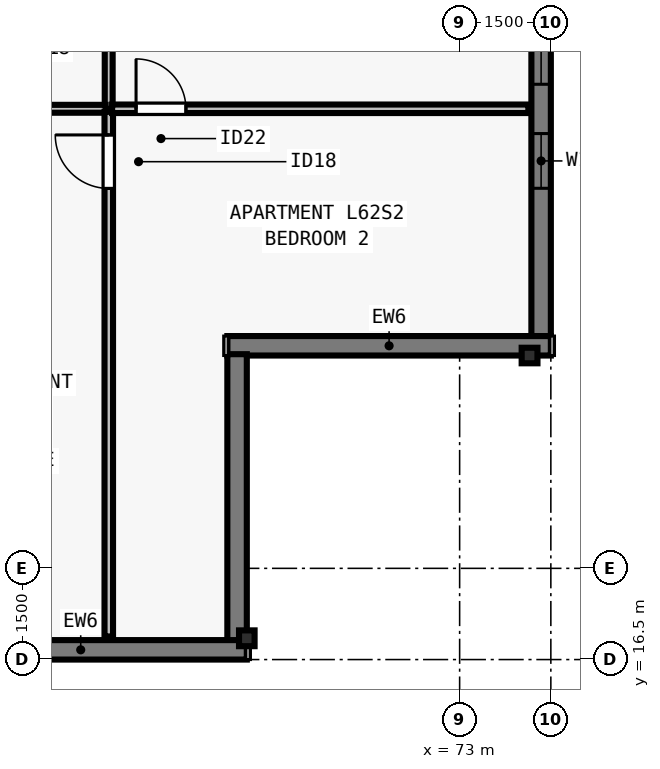
"""IFC4 building model, lengths in metres.
Left out: names, types, materials, properties, quantities, classifications, styles, units other than length and angle.
Written with IfcOpenShell. Run it as: python <this file> out.ifc"""

import sys

from ifc_helpers import new_model, si_unit, direction, frame, frame_2d, origin, origin_2d, place, context, subcontext, project, spatial, rectangle, i_section, extrude, element, fill, save


model = new_model("IFC4")
c1 = context("Model", 3, precision=1e-05, world=origin(), true_north=direction((0.0, 1.0)))
c2 = subcontext(c1, "Body", "Model", "MODEL_VIEW")
j1 = project(units=[si_unit("LENGTHUNIT", "METRE"), si_unit("PLANEANGLEUNIT", "RADIAN")], contexts=[c1])
p1 = place(None, origin())
s1 = spatial("IfcSite", under=j1, at=p1, CompositionType="ELEMENT")
p2 = place(p1, origin())
s2 = spatial("IfcBuilding", under=s1, at=p2, CompositionType="ELEMENT")
p3 = place(p2, frame((0.0, 0.0, 227.0)))
s3 = spatial("IfcBuildingStorey", under=s2, at=p3, CompositionType="ELEMENT", Elevation=227.0)
for number, where, z_axis, x_axis in (
    (1, (69.5, 16.85, 0.0), (0.0, 0.0, 1.0), (1.0, 0.0, 0.0)),
    (2, (74.15, 21.5, 0.0), (0.0, 0.0, 1.0), (0.0, 1.0, 0.0)),
):
    element("IfcColumn", number, at=place(p3, frame(where, z_axis=z_axis, x_axis=x_axis)), inside=s3, PredefinedType="COLUMN", context=c2, shape_type="SweptSolid", body=[
        extrude(i_section(OverallWidth=0.256, OverallDepth=0.26, WebThickness=0.01, FlangeThickness=0.017, FilletRadius=0.013, at=origin_2d()), origin(), (0.0, 0.0, 1.0), 3.5),
    ])
p4 = place(p3, frame((74.34, 56.5, 0.0), z_axis=(0.0, 0.0, 1.0), x_axis=(0.0, -1.0, 0.0)))
e3 = element("IfcWall", 3, at=p4, inside=s3, PredefinedType="SOLIDWALL", context=c2, shape_type="SweptSolid", body=[
    extrude(rectangle(XDim=34.702, YDim=0.32, at=frame_2d((17.351, 0.0))), origin(), (0.0, 0.0, 1.0), 3.29),
])
p5 = place(p4, frame((4.763, 0.0, 0.8)))
e4 = element("IfcOpeningElement", 4, at=p5, cuts=e3, PredefinedType="OPENING", context=c2, shape_type="SweptSolid", body=[
    extrude(rectangle(XDim=1.55, YDim=1.678, at=frame_2d((0.775, 0.839))), frame((0.0, 0.17, 0.0), z_axis=(0.0, -1.0, 0.0), x_axis=(1.0, 0.0, 0.0)), (0.0, 0.0, 1.0), 0.34),
])
p6 = place(p4, frame((9.238, 0.0, 0.8)))
e5 = element("IfcOpeningElement", 5, at=p6, cuts=e3, PredefinedType="OPENING", context=c2, shape_type="SweptSolid", body=[
    extrude(rectangle(XDim=1.85, YDim=1.678, at=frame_2d((0.925, 0.839))), frame((0.0, 0.17, 0.0), z_axis=(0.0, -1.0, 0.0), x_axis=(1.0, 0.0, 0.0)), (0.0, 0.0, 1.0), 0.34),
])
p7 = place(p4, frame((14.738, 0.0, 0.8)))
e6 = element("IfcOpeningElement", 6, at=p7, cuts=e3, PredefinedType="OPENING", context=c2, shape_type="SweptSolid", body=[
    extrude(rectangle(XDim=1.85, YDim=1.678, at=frame_2d((0.925, 0.839))), frame((0.0, 0.17, 0.0), z_axis=(0.0, -1.0, 0.0), x_axis=(1.0, 0.0, 0.0)), (0.0, 0.0, 1.0), 0.34),
])
p8 = place(p4, frame((18.264, 0.0, 0.8)))
e7 = element("IfcOpeningElement", 7, at=p8, cuts=e3, PredefinedType="OPENING", context=c2, shape_type="SweptSolid", body=[
    extrude(rectangle(XDim=1.55, YDim=1.678, at=frame_2d((0.775, 0.839))), frame((0.0, 0.17, 0.0), z_axis=(0.0, -1.0, 0.0), x_axis=(1.0, 0.0, 0.0)), (0.0, 0.0, 1.0), 0.34),
])
p9 = place(p4, frame((24.164, 0.0, 0.8)))
e8 = element("IfcOpeningElement", 8, at=p9, cuts=e3, PredefinedType="OPENING", context=c2, shape_type="SweptSolid", body=[
    extrude(rectangle(XDim=1.55, YDim=1.678, at=frame_2d((0.775, 0.839))), frame((0.0, 0.17, 0.0), z_axis=(0.0, -1.0, 0.0), x_axis=(1.0, 0.0, 0.0)), (0.0, 0.0, 1.0), 0.34),
])
p10 = place(p4, frame((28.689, 0.0, 0.8)))
e9 = element("IfcOpeningElement", 9, at=p10, cuts=e3, PredefinedType="OPENING", context=c2, shape_type="SweptSolid", body=[
    extrude(rectangle(XDim=1.85, YDim=1.678, at=frame_2d((0.925, 0.839))), frame((0.0, 0.17, 0.0), z_axis=(0.0, -1.0, 0.0), x_axis=(1.0, 0.0, 0.0)), (0.0, 0.0, 1.0), 0.34),
])
p11 = place(p4, frame((31.35, 0.0, 0.8)))
e10 = element("IfcOpeningElement", 10, at=p11, cuts=e3, PredefinedType="OPENING", context=c2, shape_type="SweptSolid", body=[
    extrude(rectangle(XDim=0.9, YDim=1.678, at=frame_2d((0.45, 0.839))), frame((0.0, 0.17, 0.0), z_axis=(0.0, -1.0, 0.0), x_axis=(1.0, 0.0, 0.0)), (0.0, 0.0, 1.0), 0.34),
])
p12 = place(p3, frame((74.5, 21.66, 0.0), z_axis=(0.0, 0.0, 1.0), x_axis=(-1.0, 0.0, 0.0)))
e11 = element("IfcWall", 11, at=p12, inside=s3, PredefinedType="SOLIDWALL", context=c2, shape_type="SweptSolid", body=[
    extrude(rectangle(XDim=5.32, YDim=0.32, at=frame_2d((2.66, 0.0))), origin(), (0.0, 0.0, 1.0), 3.29),
])
p13 = place(p3, frame((69.34, 21.522, 0.0), z_axis=(0.0, 0.0, 1.0), x_axis=(0.0, -1.0, 0.0)))
e12 = element("IfcWall", 12, at=p13, inside=s3, PredefinedType="SOLIDWALL", context=c2, shape_type="SweptSolid", body=[
    extrude(rectangle(XDim=4.724, YDim=0.32, at=frame_2d((2.362, 0.0))), origin(), (0.0, 0.0, 1.0), 3.29),
])
p14 = place(p3, frame((69.5, 16.66, 0.0), z_axis=(0.0, 0.0, 1.0), x_axis=(-1.0, 0.0, 0.0)))
e13 = element("IfcWall", 13, at=p14, inside=s3, PredefinedType="SOLIDWALL", context=c2, shape_type="SweptSolid", body=[
    extrude(rectangle(XDim=34.702, YDim=0.32, at=frame_2d((17.351, 0.0))), origin(), (0.0, 0.0, 1.0), 3.29),
])
p15 = place(p14, frame((5.613, 0.0, 0.8)))
e14 = element("IfcOpeningElement", 14, at=p15, cuts=e13, PredefinedType="OPENING", context=c2, shape_type="SweptSolid", body=[
    extrude(rectangle(XDim=1.55, YDim=1.678, at=frame_2d((0.775, 0.839))), frame((0.0, 0.17, 0.0), z_axis=(0.0, -1.0, 0.0), x_axis=(1.0, 0.0, 0.0)), (0.0, 0.0, 1.0), 0.34),
])
p16 = place(p14, frame((7.988, 0.0, 0.8)))
e15 = element("IfcOpeningElement", 15, at=p16, cuts=e13, PredefinedType="OPENING", context=c2, shape_type="SweptSolid", body=[
    extrude(rectangle(XDim=1.85, YDim=1.678, at=frame_2d((0.925, 0.839))), frame((0.0, 0.17, 0.0), z_axis=(0.0, -1.0, 0.0), x_axis=(1.0, 0.0, 0.0)), (0.0, 0.0, 1.0), 0.34),
])
p17 = place(p14, frame((10.263, 0.0, 0.8)))
e16 = element("IfcOpeningElement", 16, at=p17, cuts=e13, PredefinedType="OPENING", context=c2, shape_type="SweptSolid", body=[
    extrude(rectangle(XDim=1.55, YDim=1.678, at=frame_2d((0.775, 0.839))), frame((0.0, 0.17, 0.0), z_axis=(0.0, -1.0, 0.0), x_axis=(1.0, 0.0, 0.0)), (0.0, 0.0, 1.0), 0.34),
])
p18 = place(p14, frame((14.738, 0.0, 0.8)))
e17 = element("IfcOpeningElement", 17, at=p18, cuts=e13, PredefinedType="OPENING", context=c2, shape_type="SweptSolid", body=[
    extrude(rectangle(XDim=1.85, YDim=1.678, at=frame_2d((0.925, 0.839))), frame((0.0, 0.17, 0.0), z_axis=(0.0, -1.0, 0.0), x_axis=(1.0, 0.0, 0.0)), (0.0, 0.0, 1.0), 0.34),
])
p19 = place(p14, frame((18.264, 0.0, 0.8)))
e18 = element("IfcOpeningElement", 18, at=p19, cuts=e13, PredefinedType="OPENING", context=c2, shape_type="SweptSolid", body=[
    extrude(rectangle(XDim=1.55, YDim=1.678, at=frame_2d((0.775, 0.839))), frame((0.0, 0.17, 0.0), z_axis=(0.0, -1.0, 0.0), x_axis=(1.0, 0.0, 0.0)), (0.0, 0.0, 1.0), 0.34),
])
p20 = place(p14, frame((24.564, 0.0, 0.8)))
e19 = element("IfcOpeningElement", 19, at=p20, cuts=e13, PredefinedType="OPENING", context=c2, shape_type="SweptSolid", body=[
    extrude(rectangle(XDim=1.55, YDim=1.678, at=frame_2d((0.775, 0.839))), frame((0.0, 0.17, 0.0), z_axis=(0.0, -1.0, 0.0), x_axis=(1.0, 0.0, 0.0)), (0.0, 0.0, 1.0), 0.34),
])
p21 = place(p14, frame((28.24, 0.0, 0.8)))
e20 = element("IfcOpeningElement", 20, at=p21, cuts=e13, PredefinedType="OPENING", context=c2, shape_type="SweptSolid", body=[
    extrude(rectangle(XDim=1.85, YDim=1.678, at=frame_2d((0.925, 0.839))), frame((0.0, 0.17, 0.0), z_axis=(0.0, -1.0, 0.0), x_axis=(1.0, 0.0, 0.0)), (0.0, 0.0, 1.0), 0.34),
])
p22 = place(p3, frame((67.229, 25.558, 0.0), z_axis=(0.0, 0.0, 1.0), x_axis=(0.0, 1.0, 0.0)))
e21 = element("IfcWall", 21, at=p22, inside=s3, PredefinedType="PLUMBINGWALL", context=c2, shape_type="SweptSolid", body=[
    extrude(rectangle(XDim=2.75, YDim=0.13, at=frame_2d((1.375, 0.0))), origin(), (0.0, 0.0, 1.0), 3.29),
])
p23 = place(p3, frame((64.029, 25.558, 0.0), z_axis=(0.0, 0.0, 1.0), x_axis=(1.0, 0.0, 0.0)))
e22 = element("IfcWall", 22, at=p23, inside=s3, PredefinedType="PLUMBINGWALL", context=c2, shape_type="SweptSolid", body=[
    extrude(rectangle(XDim=3.15, YDim=0.13, at=frame_2d((1.575, 0.0))), origin(), (0.0, 0.0, 1.0), 3.29),
])
p24 = place(p3, frame((67.23, 16.88, 0.0), z_axis=(0.0, 0.0, 1.0), x_axis=(0.0, 1.0, 0.0)))
e23 = element("IfcWall", 23, at=p24, inside=s3, PredefinedType="PARTITIONING", context=c2, shape_type="SweptSolid", body=[
    extrude(rectangle(XDim=8.628, YDim=0.14, at=frame_2d((4.314, 0.0))), origin(), (0.0, 0.0, 1.0), 2.573),
])
p25 = place(p24, frame((7.367, 0.0, 0.0)))
e24 = element("IfcOpeningElement", 24, at=p25, cuts=e23, PredefinedType="OPENING", context=c2, shape_type="SweptSolid", body=[
    extrude(rectangle(XDim=0.88, YDim=2.1, at=frame_2d((0.44, 1.05))), frame((0.0, 0.08, 0.0), z_axis=(0.0, -1.0, 0.0), x_axis=(1.0, 0.0, 0.0)), (0.0, 0.0, 1.0), 0.16),
])
p26 = place(p3, frame((67.285, 25.558, 0.0), z_axis=(0.0, 0.0, 1.0), x_axis=(1.0, 0.0, 0.0)))
e25 = element("IfcWall", 25, at=p26, inside=s3, PredefinedType="PARTITIONING", context=c2, shape_type="SweptSolid", body=[
    extrude(rectangle(XDim=6.845, YDim=0.14, at=frame_2d((3.422, 0.0))), origin(), (0.0, 0.0, 1.0), 2.958),
])
p27 = place(p26, frame((0.394, 0.0, 0.0)))
e26 = element("IfcOpeningElement", 26, at=p27, cuts=e25, PredefinedType="OPENING", context=c2, shape_type="SweptSolid", body=[
    extrude(rectangle(XDim=0.82, YDim=2.1, at=frame_2d((0.41, 1.05))), frame((0.0, 0.08, 0.0), z_axis=(0.0, -1.0, 0.0), x_axis=(1.0, 0.0, 0.0)), (0.0, 0.0, 1.0), 0.16),
])
p28 = place(p10, origin())
e27 = element("IfcWindow", 27, at=p28, inside=s3, PartitioningType="SINGLE_PANEL", PredefinedType="WINDOW", context=c2, shape_type="SweptSolid", body=[
    extrude(rectangle(XDim=1.85, YDim=1.678, at=frame_2d((0.925, 0.839))), frame((0.0, -0.05, 0.0), z_axis=(0.0, -1.0, 0.0), x_axis=(1.0, 0.0, 0.0)), (0.0, 0.0, 1.0), 0.06),
])
fill(e9, e27)
p29 = place(p11, origin())
e28 = element("IfcWindow", 28, at=p29, inside=s3, PartitioningType="SINGLE_PANEL", PredefinedType="WINDOW", context=c2, shape_type="SweptSolid", body=[
    extrude(rectangle(XDim=0.9, YDim=1.678, at=frame_2d((0.45, 0.839))), frame((0.0, -0.04, 0.0), z_axis=(0.0, -1.0, 0.0), x_axis=(1.0, 0.0, 0.0)), (0.0, 0.0, 1.0), 0.06),
])
fill(e10, e28)
p30 = place(p27, origin())
e29 = element("IfcDoor", 29, at=p30, inside=s3, OperationType="SINGLE_SWING_LEFT", PredefinedType="DOOR", context=c2, shape_type="SweptSolid", body=[
    extrude(rectangle(XDim=0.82, YDim=2.1, at=frame_2d((0.41, 1.05))), frame((0.0, 0.025, 0.0), z_axis=(0.0, -1.0, 0.0), x_axis=(1.0, 0.0, 0.0)), (0.0, 0.0, 1.0), 0.05),
])
fill(e26, e29)
p31 = place(p25, origin())
e30 = element("IfcDoor", 30, at=p31, inside=s3, OperationType="SINGLE_SWING_RIGHT", PredefinedType="DOOR", context=c2, shape_type="SweptSolid", body=[
    extrude(rectangle(XDim=0.88, YDim=2.1, at=frame_2d((0.44, 1.05))), frame((0.0, 0.025, 0.0), z_axis=(0.0, -1.0, 0.0), x_axis=(1.0, 0.0, 0.0)), (0.0, 0.0, 1.0), 0.05),
])
fill(e24, e30)
save(model, sys.argv[1])
